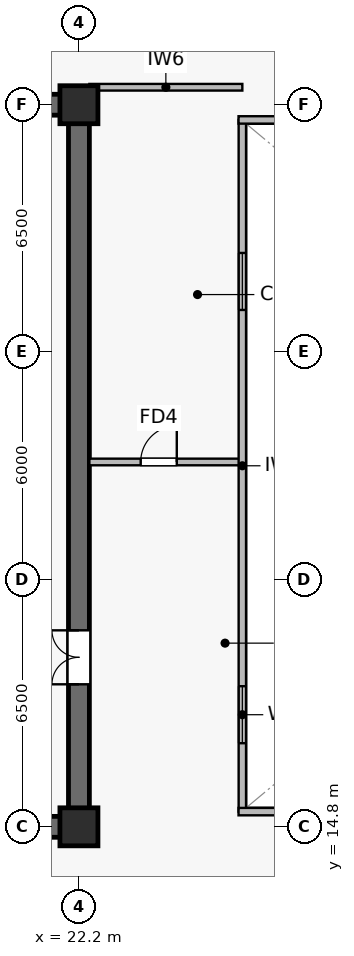
"""IFC4 building model, lengths in metres.
Left out: names, types, materials, properties, quantities, classifications, styles, units other than length and angle.
Written with IfcOpenShell. Run it as: python <this file> out.ifc"""

import sys

from ifc_helpers import new_model, si_unit, direction, frame, frame_2d, origin, origin_2d, place, context, subcontext, project, spatial, rectangle, extrude, source, transform, mapped, element, fill, save


model = new_model("IFC4")
c1 = context("Model", 3, precision=1e-05, world=origin(), true_north=direction((0.0, 1.0)))
c2 = subcontext(c1, "Body", "Model", "MODEL_VIEW")
j1 = project(units=[si_unit("LENGTHUNIT", "METRE"), si_unit("PLANEANGLEUNIT", "RADIAN")], contexts=[c1])
p1 = place(None, origin())
s1 = spatial("IfcSite", under=j1, at=p1, CompositionType="ELEMENT")
p2 = place(p1, origin())
s2 = spatial("IfcBuilding", under=s1, at=p2, CompositionType="ELEMENT")
p3 = place(p2, frame((0.0, 0.0, 283.4)))
s3 = spatial("IfcBuildingStorey", under=s2, at=p3, CompositionType="ELEMENT", Elevation=283.4)
p4 = place(p3, frame((7.125, 14.8, 0.0), z_axis=(0.0, 0.0, 1.0), x_axis=(1.0, 0.0, 0.0)))
e1 = element("IfcWall", 1, at=p4, inside=s3, PredefinedType="SHEAR", context=c2, shape_type="SweptSolid", body=[
    extrude(rectangle(XDim=15.35, YDim=0.55, at=frame_2d((7.675, 0.0))), origin(), (0.0, 0.0, 1.0), 3.8),
])
p5 = place(p3, frame((7.125, 33.8, 0.0), z_axis=(0.0, 0.0, 1.0), x_axis=(1.0, 0.0, 0.0)))
e2 = element("IfcWall", 2, at=p5, inside=s3, PredefinedType="SHEAR", context=c2, shape_type="SweptSolid", body=[
    extrude(rectangle(XDim=15.35, YDim=0.55, at=frame_2d((7.675, 0.0))), origin(), (0.0, 0.0, 1.0), 3.8),
])
p6 = place(p5, frame((6.775, 0.0, 0.0)))
e3 = element("IfcOpeningElement", 3, at=p6, cuts=e2, PredefinedType="OPENING", context=c2, shape_type="SweptSolid", body=[
    extrude(rectangle(XDim=0.95, YDim=2.15, at=frame_2d((0.475, 1.075))), frame((0.0, 0.285, 0.0), z_axis=(0.0, -1.0, 0.0), x_axis=(1.0, 0.0, 0.0)), (0.0, 0.0, 1.0), 0.57),
])
p7 = place(p5, frame((11.84, 0.0, 0.0)))
e4 = element("IfcOpeningElement", 4, at=p7, cuts=e2, PredefinedType="OPENING", context=c2, shape_type="SweptSolid", body=[
    extrude(rectangle(XDim=0.95, YDim=2.15, at=frame_2d((0.475, 1.075))), frame((0.0, 0.285, 0.0), z_axis=(0.0, -1.0, 0.0), x_axis=(1.0, 0.0, 0.0)), (0.0, 0.0, 1.0), 0.57),
])
p8 = place(p3, frame((22.2, 15.075, 0.0), z_axis=(0.0, 0.0, 1.0), x_axis=(0.0, 1.0, 0.0)))
e5 = element("IfcWall", 5, at=p8, inside=s3, PredefinedType="SHEAR", context=c2, shape_type="SweptSolid", body=[
    extrude(rectangle(XDim=18.45, YDim=0.55, at=frame_2d((9.225, 0.0))), origin(), (0.0, 0.0, 1.0), 3.8),
])
p9 = place(p8, frame((3.475, 0.0, 0.0)))
e6 = element("IfcOpeningElement", 6, at=p9, cuts=e5, PredefinedType="OPENING", context=c2, shape_type="SweptSolid", body=[
    extrude(rectangle(XDim=1.42, YDim=2.2, at=frame_2d((0.71, 1.1))), frame((0.0, 0.285, 0.0), z_axis=(0.0, -1.0, 0.0), x_axis=(1.0, 0.0, 0.0)), (0.0, 0.0, 1.0), 0.57),
])
m1 = source(origin(), c2, "Body", "SweptSolid", [
    extrude(rectangle(XDim=1.0, YDim=1.0, at=origin_2d()), origin(), (0.0, 0.0, 1.0), 4.1),
])
for number, where, z_axis, x_axis in (
    (7, (22.2, 14.8, 0.0), (0.0, 0.0, 1.0), (1.0, 0.0, 0.0)),
    (8, (22.2, 33.8, 0.0), (0.0, 0.0, 1.0), (1.0, 0.0, 0.0)),
):
    element("IfcColumn", number, at=place(p3, frame(where, z_axis=z_axis, x_axis=x_axis)), inside=s3, PredefinedType="COLUMN", context=c2, shape_type="MappedRepresentation", body=[
        mapped(m1, transform((0.0, 0.0, 0.0), scale=1.0)),
    ])
p10 = place(p3, frame((22.475, 34.26, 0.0), z_axis=(0.0, 0.0, 1.0), x_axis=(1.0, 0.0, 0.0)))
e9 = element("IfcWall", 9, at=p10, inside=s3, PredefinedType="PARTITIONING", context=c2, shape_type="SweptSolid", body=[
    extrude(rectangle(XDim=4.025, YDim=0.175, at=frame_2d((2.012, 0.0))), origin(), (0.0, 0.0, 1.0), 3.535),
])
p11 = place(p3, frame((22.475, 24.4, 0.0), z_axis=(0.0, 0.0, 1.0), x_axis=(1.0, 0.0, 0.0)))
e10 = element("IfcWall", 10, at=p11, inside=s3, PredefinedType="PARTITIONING", context=c2, shape_type="SweptSolid", body=[
    extrude(rectangle(XDim=4.025, YDim=0.175, at=frame_2d((2.012, 0.0))), origin(), (0.0, 0.0, 1.0), 3.8),
])
p12 = place(p11, frame((1.35, 0.0, 0.0)))
e11 = element("IfcOpeningElement", 11, at=p12, cuts=e10, PredefinedType="OPENING", context=c2, shape_type="SweptSolid", body=[
    extrude(rectangle(XDim=0.95, YDim=2.15, at=frame_2d((0.475, 1.075))), frame((0.0, 0.098, 0.0), z_axis=(0.0, -1.0, 0.0), x_axis=(1.0, 0.0, 0.0)), (0.0, 0.0, 1.0), 0.195),
])
p13 = place(p3, frame((26.5, 15.2, 0.0), z_axis=(0.0, 0.0, 1.0), x_axis=(0.0, 1.0, 0.0)))
e12 = element("IfcWall", 12, at=p13, inside=s3, PredefinedType="SOLIDWALL", context=c2, shape_type="SweptSolid", body=[
    extrude(rectangle(XDim=18.2, YDim=0.195, at=frame_2d((9.1, 0.0))), origin(), (0.0, 0.0, 1.0), 3.8),
])
p14 = place(p13, frame((1.8, 0.0, 0.9)))
e13 = element("IfcOpeningElement", 13, at=p14, cuts=e12, PredefinedType="OPENING", context=c2, shape_type="SweptSolid", body=[
    extrude(rectangle(XDim=1.5, YDim=1.4, at=frame_2d((0.75, 0.7))), frame((0.0, 0.107, 0.0), z_axis=(0.0, -1.0, 0.0), x_axis=(1.0, 0.0, 0.0)), (0.0, 0.0, 1.0), 0.215),
])
p15 = place(p13, frame((13.2, 0.0, 0.9)))
e14 = element("IfcOpeningElement", 14, at=p15, cuts=e12, PredefinedType="OPENING", context=c2, shape_type="SweptSolid", body=[
    extrude(rectangle(XDim=1.5, YDim=1.4, at=frame_2d((0.75, 0.7))), frame((0.0, 0.107, 0.0), z_axis=(0.0, -1.0, 0.0), x_axis=(1.0, 0.0, 0.0)), (0.0, 0.0, 1.0), 0.215),
])
for number, where, z_axis, x_axis in (
    (15, (26.4, 15.2, 0.0), (0.0, 0.0, 1.0), (1.0, 0.0, 0.0)),
    (16, (26.4, 33.4, 0.0), (0.0, 0.0, 1.0), (1.0, 0.0, 0.0)),
):
    element("IfcWall", number, at=place(p3, frame(where, z_axis=z_axis, x_axis=x_axis)), inside=s3, PredefinedType="SOLIDWALL", context=c2, shape_type="SweptSolid", body=[
        extrude(rectangle(XDim=22.0, YDim=0.195, at=frame_2d((11.0, 0.0))), origin(), (0.0, 0.0, 1.0), 3.8),
    ])
m2 = source(origin(), c2, "Body", "SweptSolid", [
    extrude(rectangle(XDim=1.5, YDim=1.4, at=frame_2d((0.75, 0.7))), frame((0.0, 0.03, 0.0), z_axis=(0.0, -1.0, 0.0), x_axis=(1.0, 0.0, 0.0)), (0.0, 0.0, 1.0), 0.06),
])
p16 = place(p14, origin())
e17 = element("IfcWindow", 17, at=p16, inside=s3, PartitioningType="SINGLE_PANEL", PredefinedType="WINDOW", context=c2, shape_type="MappedRepresentation", body=[
    mapped(m2, transform((0.0, 0.0, 0.0), scale=1.0)),
])
fill(e13, e17)
p17 = place(p15, origin())
e18 = element("IfcWindow", 18, at=p17, inside=s3, PartitioningType="SINGLE_PANEL", PredefinedType="WINDOW", context=c2, shape_type="MappedRepresentation", body=[
    mapped(m2, transform((0.0, 0.0, 0.0), scale=1.0)),
])
fill(e14, e18)
m3 = source(origin(), c2, "Body", "SweptSolid", [
    extrude(rectangle(XDim=1.42, YDim=2.2, at=frame_2d((0.71, 1.1))), frame((0.0, 0.025, 0.0), z_axis=(0.0, -1.0, 0.0), x_axis=(1.0, 0.0, 0.0)), (0.0, 0.0, 1.0), 0.05),
])
p18 = place(p9, origin())
e19 = element("IfcDoor", 19, at=p18, inside=s3, OperationType="DOUBLE_DOOR_SINGLE_SWING", PredefinedType="DOOR", context=c2, shape_type="MappedRepresentation", body=[
    mapped(m3, transform((0.0, 0.0, 0.0), scale=1.0)),
])
fill(e6, e19)
m4 = source(origin(), c2, "Body", "SweptSolid", [
    extrude(rectangle(XDim=0.95, YDim=2.15, at=frame_2d((0.475, 1.075))), frame((0.0, 0.025, 0.0), z_axis=(0.0, -1.0, 0.0), x_axis=(1.0, 0.0, 0.0)), (0.0, 0.0, 1.0), 0.05),
])
p19 = place(p12, origin())
e20 = element("IfcDoor", 20, at=p19, inside=s3, OperationType="SINGLE_SWING_RIGHT", PredefinedType="DOOR", context=c2, shape_type="MappedRepresentation", body=[
    mapped(m4, transform((0.0, 0.0, 0.0), scale=1.0)),
])
fill(e11, e20)
save(model, sys.argv[1])
